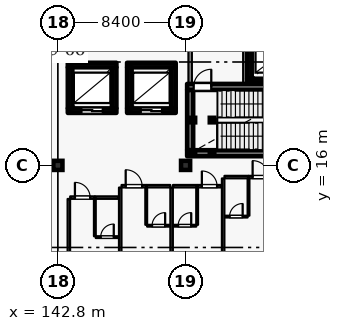
"""IFC4 building model, lengths in metres.
Left out: names, types, materials, properties, quantities, classifications, styles, units other than length and angle.
Written with IfcOpenShell. Run it as: python <this file> out.ifc"""

import sys

from ifc_helpers import new_model, si_unit, direction, frame, frame_2d, origin, origin_2d, place, context, subcontext, project, spatial, rectangle, hollow_rectangle, extrude, element, fill, save


model = new_model("IFC4")
c1 = context("Model", 3, precision=1e-05, world=origin(), true_north=direction((0.0, 1.0)))
c2 = subcontext(c1, "Body", "Model", "MODEL_VIEW")
j1 = project(units=[si_unit("LENGTHUNIT", "METRE"), si_unit("PLANEANGLEUNIT", "RADIAN")], contexts=[c1])
p1 = place(None, origin())
s1 = spatial("IfcSite", under=j1, at=p1, CompositionType="ELEMENT")
p2 = place(p1, origin())
s2 = spatial("IfcBuilding", under=s1, at=p2, CompositionType="ELEMENT")
p3 = place(p2, frame((0.0, 0.0, 43.2)))
s3 = spatial("IfcBuildingStorey", under=s2, at=p3, CompositionType="ELEMENT", Elevation=43.2)
for number, where, z_axis, x_axis in (
    (1, (142.8, 16.0, 0.0), (0.0, 0.0, 1.0), (1.0, 0.0, 0.0)),
    (2, (151.2, 16.0, 0.0), (0.0, 0.0, 1.0), (1.0, 0.0, 0.0)),
):
    element("IfcColumn", number, at=place(p3, frame(where, z_axis=z_axis, x_axis=x_axis)), inside=s3, PredefinedType="COLUMN", context=c2, shape_type="SweptSolid", body=[
        extrude(rectangle(XDim=0.6, YDim=0.6, at=origin_2d()), origin(), (0.0, 0.0, 1.0), 4.2),
    ])
p4 = place(p3, frame((155.25, 21.55, 0.0), z_axis=(0.0, 0.0, 1.0), x_axis=(1.0, 0.0, 0.0)))
e3 = element("IfcWall", 3, at=p4, inside=s3, PredefinedType="SHEAR", context=c2, shape_type="SweptSolid", body=[
    extrude(rectangle(XDim=3.5, YDim=0.3, at=frame_2d((1.75, 0.0))), origin(), (0.0, 0.0, 1.0), 3.935),
])
p5 = place(p3, frame((155.4, 24.295, 0.0), z_axis=(0.0, 0.0, 1.0), x_axis=(0.0, -1.0, 0.0)))
e4 = element("IfcWall", 4, at=p5, inside=s3, PredefinedType="SHEAR", context=c2, shape_type="SweptSolid", body=[
    extrude(rectangle(XDim=2.59, YDim=0.3, at=frame_2d((1.295, 0.0))), origin(), (0.0, 0.0, 1.0), 3.935),
])
p6 = place(p3, frame((143.45, 19.6, 0.0), z_axis=(0.0, 0.0, 1.0), x_axis=(1.0, 0.0, 0.0)))
e5 = element("IfcWall", 5, at=p6, inside=s3, PredefinedType="SHEAR", context=c2, shape_type="SweptSolid", body=[
    extrude(rectangle(XDim=3.2, YDim=0.3, at=frame_2d((1.6, 0.0))), origin(), (0.0, 0.0, 1.0), 3.935),
])
p7 = place(p6, frame((0.9, 0.0, 0.0)))
e6 = element("IfcOpeningElement", 6, at=p7, cuts=e5, PredefinedType="OPENING", context=c2, shape_type="SweptSolid", body=[
    extrude(rectangle(XDim=1.4, YDim=2.35, at=frame_2d((0.7, 1.175))), frame((0.0, 0.16, 0.0), z_axis=(0.0, -1.0, 0.0), x_axis=(1.0, 0.0, 0.0)), (0.0, 0.0, 1.0), 0.32),
])
p8 = place(p3, frame((146.5, 19.755, 0.0), z_axis=(0.0, 0.0, 1.0), x_axis=(0.0, 1.0, 0.0)))
e7 = element("IfcWall", 7, at=p8, inside=s3, PredefinedType="SHEAR", context=c2, shape_type="SweptSolid", body=[
    extrude(rectangle(XDim=2.69, YDim=0.3, at=frame_2d((1.345, 0.0))), origin(), (0.0, 0.0, 1.0), 3.935),
])
p9 = place(p3, frame((146.65, 22.6, 0.0), z_axis=(0.0, 0.0, 1.0), x_axis=(-1.0, 0.0, 0.0)))
e8 = element("IfcWall", 8, at=p9, inside=s3, PredefinedType="SHEAR", context=c2, shape_type="SweptSolid", body=[
    extrude(rectangle(XDim=3.2, YDim=0.3, at=frame_2d((1.6, 0.0))), origin(), (0.0, 0.0, 1.0), 3.935),
])
p10 = place(p3, frame((143.6, 22.445, 0.0), z_axis=(0.0, 0.0, 1.0), x_axis=(0.0, -1.0, 0.0)))
e9 = element("IfcWall", 9, at=p10, inside=s3, PredefinedType="SHEAR", context=c2, shape_type="SweptSolid", body=[
    extrude(rectangle(XDim=2.69, YDim=0.3, at=frame_2d((1.345, 0.0))), origin(), (0.0, 0.0, 1.0), 3.935),
])
p11 = place(p3, frame((147.35, 19.6, 0.0), z_axis=(0.0, 0.0, 1.0), x_axis=(1.0, 0.0, 0.0)))
e10 = element("IfcWall", 10, at=p11, inside=s3, PredefinedType="SHEAR", context=c2, shape_type="SweptSolid", body=[
    extrude(rectangle(XDim=3.2, YDim=0.3, at=frame_2d((1.6, 0.0))), origin(), (0.0, 0.0, 1.0), 3.935),
])
p12 = place(p11, frame((0.9, 0.0, 0.0)))
e11 = element("IfcOpeningElement", 11, at=p12, cuts=e10, PredefinedType="OPENING", context=c2, shape_type="SweptSolid", body=[
    extrude(rectangle(XDim=1.4, YDim=2.35, at=frame_2d((0.7, 1.175))), frame((0.0, 0.16, 0.0), z_axis=(0.0, -1.0, 0.0), x_axis=(1.0, 0.0, 0.0)), (0.0, 0.0, 1.0), 0.32),
])
p13 = place(p3, frame((150.4, 19.755, 0.0), z_axis=(0.0, 0.0, 1.0), x_axis=(0.0, 1.0, 0.0)))
e12 = element("IfcWall", 12, at=p13, inside=s3, PredefinedType="SHEAR", context=c2, shape_type="SweptSolid", body=[
    extrude(rectangle(XDim=2.69, YDim=0.3, at=frame_2d((1.345, 0.0))), origin(), (0.0, 0.0, 1.0), 3.935),
])
p14 = place(p3, frame((150.55, 22.6, 0.0), z_axis=(0.0, 0.0, 1.0), x_axis=(-1.0, 0.0, 0.0)))
e13 = element("IfcWall", 13, at=p14, inside=s3, PredefinedType="SHEAR", context=c2, shape_type="SweptSolid", body=[
    extrude(rectangle(XDim=3.2, YDim=0.3, at=frame_2d((1.6, 0.0))), origin(), (0.0, 0.0, 1.0), 3.935),
])
p15 = place(p3, frame((147.5, 22.445, 0.0), z_axis=(0.0, 0.0, 1.0), x_axis=(0.0, -1.0, 0.0)))
e14 = element("IfcWall", 14, at=p15, inside=s3, PredefinedType="SHEAR", context=c2, shape_type="SweptSolid", body=[
    extrude(rectangle(XDim=2.69, YDim=0.3, at=frame_2d((1.345, 0.0))), origin(), (0.0, 0.0, 1.0), 3.935),
])
p16 = place(p3, frame((151.3, 16.8, 0.0), z_axis=(0.0, 0.0, 1.0), x_axis=(1.0, 0.0, 0.0)))
e15 = element("IfcWall", 15, at=p16, inside=s3, PredefinedType="SHEAR", context=c2, shape_type="SweptSolid", body=[
    extrude(rectangle(XDim=8.2, YDim=0.4, at=frame_2d((4.1, 0.0))), origin(), (0.0, 0.0, 1.0), 3.935),
])
p17 = place(p3, frame((151.3, 21.16, 0.0), z_axis=(0.0, 0.0, 1.0), x_axis=(1.0, 0.0, 0.0)))
e16 = element("IfcWall", 16, at=p17, inside=s3, PredefinedType="SHEAR", context=c2, shape_type="SweptSolid", body=[
    extrude(rectangle(XDim=8.2, YDim=0.4, at=frame_2d((4.1, 0.0))), origin(), (0.0, 0.0, 1.0), 3.935),
])
p18 = place(p17, frame((0.43, 0.0, 0.0)))
e17 = element("IfcOpeningElement", 17, at=p18, cuts=e16, PredefinedType="OPENING", context=c2, shape_type="SweptSolid", body=[
    extrude(rectangle(XDim=1.16, YDim=2.2, at=frame_2d((0.58, 1.1))), frame((0.0, 0.21, 0.0), z_axis=(0.0, -1.0, 0.0), x_axis=(1.0, 0.0, 0.0)), (0.0, 0.0, 1.0), 0.42),
])
p19 = place(p3, frame((151.5, 17.005, 0.0), z_axis=(0.0, 0.0, 1.0), x_axis=(0.0, 1.0, 0.0)))
e18 = element("IfcWall", 18, at=p19, inside=s3, PredefinedType="SHEAR", context=c2, shape_type="SweptSolid", body=[
    extrude(rectangle(XDim=3.95, YDim=0.4, at=frame_2d((1.975, 0.0))), origin(), (0.0, 0.0, 1.0), 3.935),
])
p20 = place(p3, frame((151.5, 21.365, 0.0), z_axis=(0.0, 0.0, 1.0), x_axis=(0.0, 1.0, 0.0)))
e19 = element("IfcWall", 19, at=p20, inside=s3, PredefinedType="PARTITIONING", context=c2, shape_type="SweptSolid", body=[
    extrude(rectangle(XDim=5.82, YDim=0.22, at=frame_2d((2.91, 0.0))), origin(), (0.0, 0.0, 1.0), 3.935),
])
p21 = place(p3, frame((155.1, 21.365, 0.0), z_axis=(0.0, 0.0, 1.0), x_axis=(0.0, 1.0, 0.0)))
e20 = element("IfcWall", 20, at=p21, inside=s3, PredefinedType="PARTITIONING", context=c2, shape_type="SweptSolid", body=[
    extrude(rectangle(XDim=5.82, YDim=0.22, at=frame_2d((2.91, 0.0))), origin(), (0.0, 0.0, 1.0), 3.935),
])
p22 = place(p21, frame((3.335, 0.0, 0.0)))
e21 = element("IfcOpeningElement", 21, at=p22, cuts=e20, PredefinedType="OPENING", context=c2, shape_type="SweptSolid", body=[
    extrude(rectangle(XDim=1.24, YDim=2.2, at=frame_2d((0.62, 1.1))), frame((0.0, 0.12, 0.0), z_axis=(0.0, -1.0, 0.0), x_axis=(1.0, 0.0, 0.0)), (0.0, 0.0, 1.0), 0.24),
])
for number, where, z_axis, x_axis in (
    (22, (151.68, 16.8, 0.0), (0.0, 0.0, 1.0), (1.0, 0.0, 0.0)),
    (23, (151.68, 18.98, 0.0), (0.0, 0.0, 1.0), (1.0, 0.0, 0.0)),
    (24, (152.94, 16.8, 0.0), (0.0, 0.0, 1.0), (1.0, 0.0, 0.0)),
    (25, (152.94, 18.98, 0.0), (0.0, 0.0, 1.0), (1.0, 0.0, 0.0)),
):
    element("IfcColumn", number, at=place(p3, frame(where, z_axis=z_axis, x_axis=x_axis)), inside=s3, PredefinedType="COLUMN", context=c2, shape_type="SweptSolid", body=[
        extrude(hollow_rectangle(XDim=0.3, YDim=0.3, WallThickness=0.012, at=origin_2d()), origin(), (0.0, 0.0, 1.0), 4.02),
    ])
p23 = place(p3, frame((143.61, 13.88, 0.0), z_axis=(0.0, 0.0, 1.0), x_axis=(1.0, 0.0, 0.0)))
e26 = element("IfcWall", 26, at=p23, inside=s3, PredefinedType="PARTITIONING", context=c2, shape_type="SweptSolid", body=[
    extrude(rectangle(XDim=1.62, YDim=0.16, at=frame_2d((0.81, 0.0))), origin(), (0.0, 0.0, 1.0), 3.935),
])
p24 = place(p23, frame((0.31, 0.0, 0.0)))
e27 = element("IfcOpeningElement", 27, at=p24, cuts=e26, PredefinedType="OPENING", context=c2, shape_type="SweptSolid", body=[
    extrude(rectangle(XDim=1.0, YDim=2.25, at=frame_2d((0.5, 1.125))), frame((0.0, 0.09, 0.0), z_axis=(0.0, -1.0, 0.0), x_axis=(1.0, 0.0, 0.0)), (0.0, 0.0, 1.0), 0.18),
])
p25 = place(p3, frame((145.24, 13.88, 0.0), z_axis=(0.0, 0.0, 1.0), x_axis=(1.0, 0.0, 0.0)))
e28 = element("IfcWall", 28, at=p25, inside=s3, PredefinedType="PARTITIONING", context=c2, shape_type="SweptSolid", body=[
    extrude(rectangle(XDim=1.57, YDim=0.16, at=frame_2d((0.785, 0.0))), origin(), (0.0, 0.0, 1.0), 3.935),
])
p26 = place(p3, frame((145.23, 11.34, 0.0), z_axis=(0.0, 0.0, 1.0), x_axis=(0.0, 1.0, 0.0)))
e29 = element("IfcWall", 29, at=p26, inside=s3, PredefinedType="PARTITIONING", context=c2, shape_type="SweptSolid", body=[
    extrude(rectangle(XDim=2.45, YDim=0.115, at=frame_2d((1.225, 0.0))), origin(), (0.0, 0.0, 1.0), 3.935),
])
p27 = place(p3, frame((145.29, 11.28, 0.0), z_axis=(0.0, 0.0, 1.0), x_axis=(1.0, 0.0, 0.0)))
e30 = element("IfcWall", 30, at=p27, inside=s3, PredefinedType="PARTITIONING", context=c2, shape_type="SweptSolid", body=[
    extrude(rectangle(XDim=1.51, YDim=0.115, at=frame_2d((0.755, 0.0))), origin(), (0.0, 0.0, 1.0), 3.935),
])
p28 = place(p27, frame((0.325, 0.0, 0.0)))
e31 = element("IfcOpeningElement", 31, at=p28, cuts=e30, PredefinedType="OPENING", context=c2, shape_type="SweptSolid", body=[
    extrude(rectangle(XDim=0.86, YDim=2.12, at=frame_2d((0.43, 1.06))), frame((0.0, 0.067, 0.0), z_axis=(0.0, -1.0, 0.0), x_axis=(1.0, 0.0, 0.0)), (0.0, 0.0, 1.0), 0.135),
])
p29 = place(p3, frame((143.52, 4.24, 0.0), z_axis=(0.0, 0.0, 1.0), x_axis=(0.0, 1.0, 0.0)))
e32 = element("IfcWall", 32, at=p29, inside=s3, PredefinedType="PARTITIONING", context=c2, shape_type="SweptSolid", body=[
    extrude(rectangle(XDim=9.55, YDim=0.16, at=frame_2d((4.775, 0.0))), origin(), (0.0, 0.0, 1.0), 3.935),
])
p30 = place(p3, frame((146.99, 14.63, 0.0), z_axis=(0.0, 0.0, 1.0), x_axis=(1.0, 0.0, 0.0)))
e33 = element("IfcWall", 33, at=p30, inside=s3, PredefinedType="PARTITIONING", context=c2, shape_type="SweptSolid", body=[
    extrude(rectangle(XDim=1.62, YDim=0.16, at=frame_2d((0.81, 0.0))), origin(), (0.0, 0.0, 1.0), 3.935),
])
p31 = place(p30, frame((0.27, 0.0, 0.0)))
e34 = element("IfcOpeningElement", 34, at=p31, cuts=e33, PredefinedType="OPENING", context=c2, shape_type="SweptSolid", body=[
    extrude(rectangle(XDim=1.08, YDim=2.3, at=frame_2d((0.54, 1.15))), frame((0.0, 0.09, 0.0), z_axis=(0.0, -1.0, 0.0), x_axis=(1.0, 0.0, 0.0)), (0.0, 0.0, 1.0), 0.18),
])
p32 = place(p3, frame((148.62, 14.63, 0.0), z_axis=(0.0, 0.0, 1.0), x_axis=(1.0, 0.0, 0.0)))
e35 = element("IfcWall", 35, at=p32, inside=s3, PredefinedType="PARTITIONING", context=c2, shape_type="SweptSolid", body=[
    extrude(rectangle(XDim=1.57, YDim=0.16, at=frame_2d((0.785, 0.0))), origin(), (0.0, 0.0, 1.0), 3.935),
])
p33 = place(p3, frame((148.61, 12.09, 0.0), z_axis=(0.0, 0.0, 1.0), x_axis=(0.0, 1.0, 0.0)))
e36 = element("IfcWall", 36, at=p33, inside=s3, PredefinedType="PARTITIONING", context=c2, shape_type="SweptSolid", body=[
    extrude(rectangle(XDim=2.45, YDim=0.115, at=frame_2d((1.225, 0.0))), origin(), (0.0, 0.0, 1.0), 3.935),
])
p34 = place(p3, frame((148.67, 12.03, 0.0), z_axis=(0.0, 0.0, 1.0), x_axis=(1.0, 0.0, 0.0)))
e37 = element("IfcWall", 37, at=p34, inside=s3, PredefinedType="PARTITIONING", context=c2, shape_type="SweptSolid", body=[
    extrude(rectangle(XDim=1.51, YDim=0.115, at=frame_2d((0.755, 0.0))), origin(), (0.0, 0.0, 1.0), 3.935),
])
p35 = place(p34, frame((0.325, 0.0, 0.0)))
e38 = element("IfcOpeningElement", 38, at=p35, cuts=e37, PredefinedType="OPENING", context=c2, shape_type="SweptSolid", body=[
    extrude(rectangle(XDim=0.86, YDim=2.12, at=frame_2d((0.43, 1.06))), frame((0.0, 0.067, 0.0), z_axis=(0.0, -1.0, 0.0), x_axis=(1.0, 0.0, 0.0)), (0.0, 0.0, 1.0), 0.135),
])
p36 = place(p3, frame((146.9, 7.46, 0.0), z_axis=(0.0, 0.0, 1.0), x_axis=(0.0, 1.0, 0.0)))
e39 = element("IfcWall", 39, at=p36, inside=s3, PredefinedType="PARTITIONING", context=c2, shape_type="SweptSolid", body=[
    extrude(rectangle(XDim=7.08, YDim=0.16, at=frame_2d((3.54, 0.0))), origin(), (0.0, 0.0, 1.0), 3.935),
])
p37 = place(p3, frame((150.37, 14.63, 0.0), z_axis=(0.0, 0.0, 1.0), x_axis=(1.0, 0.0, 0.0)))
e40 = element("IfcWall", 40, at=p37, inside=s3, PredefinedType="PARTITIONING", context=c2, shape_type="SweptSolid", body=[
    extrude(rectangle(XDim=1.58, YDim=0.16, at=frame_2d((0.79, 0.0))), origin(), (0.0, 0.0, 1.0), 3.935),
])
p38 = place(p3, frame((151.96, 14.63, 0.0), z_axis=(0.0, 0.0, 1.0), x_axis=(1.0, 0.0, 0.0)))
e41 = element("IfcWall", 41, at=p38, inside=s3, PredefinedType="PARTITIONING", context=c2, shape_type="SweptSolid", body=[
    extrude(rectangle(XDim=1.62, YDim=0.16, at=frame_2d((0.81, 0.0))), origin(), (0.0, 0.0, 1.0), 3.935),
])
p39 = place(p38, frame((0.31, 0.0, 0.0)))
e42 = element("IfcOpeningElement", 42, at=p39, cuts=e41, PredefinedType="OPENING", context=c2, shape_type="SweptSolid", body=[
    extrude(rectangle(XDim=1.0, YDim=2.25, at=frame_2d((0.5, 1.125))), frame((0.0, 0.09, 0.0), z_axis=(0.0, -1.0, 0.0), x_axis=(1.0, 0.0, 0.0)), (0.0, 0.0, 1.0), 0.18),
])
p40 = place(p3, frame((151.96, 12.09, 0.0), z_axis=(0.0, 0.0, 1.0), x_axis=(0.0, 1.0, 0.0)))
e43 = element("IfcWall", 43, at=p40, inside=s3, PredefinedType="PARTITIONING", context=c2, shape_type="SweptSolid", body=[
    extrude(rectangle(XDim=2.45, YDim=0.115, at=frame_2d((1.225, 0.0))), origin(), (0.0, 0.0, 1.0), 3.935),
])
p41 = place(p3, frame((150.38, 12.03, 0.0), z_axis=(0.0, 0.0, 1.0), x_axis=(1.0, 0.0, 0.0)))
e44 = element("IfcWall", 44, at=p41, inside=s3, PredefinedType="PARTITIONING", context=c2, shape_type="SweptSolid", body=[
    extrude(rectangle(XDim=1.52, YDim=0.115, at=frame_2d((0.76, 0.0))), origin(), (0.0, 0.0, 1.0), 3.935),
])
p42 = place(p41, frame((0.33, 0.0, 0.0)))
e45 = element("IfcOpeningElement", 45, at=p42, cuts=e44, PredefinedType="OPENING", context=c2, shape_type="SweptSolid", body=[
    extrude(rectangle(XDim=0.86, YDim=2.12, at=frame_2d((0.43, 1.06))), frame((0.0, 0.067, 0.0), z_axis=(0.0, -1.0, 0.0), x_axis=(1.0, 0.0, 0.0)), (0.0, 0.0, 1.0), 0.135),
])
p43 = place(p3, frame((150.28, 8.34, 0.0), z_axis=(0.0, 0.0, 1.0), x_axis=(0.0, 1.0, 0.0)))
e46 = element("IfcWall", 46, at=p43, inside=s3, PredefinedType="PARTITIONING", context=c2, shape_type="SweptSolid", body=[
    extrude(rectangle(XDim=6.2, YDim=0.16, at=frame_2d((3.1, 0.0))), origin(), (0.0, 0.0, 1.0), 3.935),
])
p44 = place(p3, frame((153.76, 15.23, 0.0), z_axis=(0.0, 0.0, 1.0), x_axis=(1.0, 0.0, 0.0)))
e47 = element("IfcWall", 47, at=p44, inside=s3, PredefinedType="PARTITIONING", context=c2, shape_type="SweptSolid", body=[
    extrude(rectangle(XDim=1.57, YDim=0.16, at=frame_2d((0.785, 0.0))), origin(), (0.0, 0.0, 1.0), 3.935),
])
p45 = place(p3, frame((155.34, 15.23, 0.0), z_axis=(0.0, 0.0, 1.0), x_axis=(1.0, 0.0, 0.0)))
e48 = element("IfcWall", 48, at=p45, inside=s3, PredefinedType="PARTITIONING", context=c2, shape_type="SweptSolid", body=[
    extrude(rectangle(XDim=1.62, YDim=0.16, at=frame_2d((0.81, 0.0))), origin(), (0.0, 0.0, 1.0), 3.935),
])
p46 = place(p45, frame((0.27, 0.0, 0.0)))
e49 = element("IfcOpeningElement", 49, at=p46, cuts=e48, PredefinedType="OPENING", context=c2, shape_type="SweptSolid", body=[
    extrude(rectangle(XDim=1.08, YDim=2.3, at=frame_2d((0.54, 1.15))), frame((0.0, 0.09, 0.0), z_axis=(0.0, -1.0, 0.0), x_axis=(1.0, 0.0, 0.0)), (0.0, 0.0, 1.0), 0.18),
])
p47 = place(p3, frame((155.34, 12.69, 0.0), z_axis=(0.0, 0.0, 1.0), x_axis=(0.0, 1.0, 0.0)))
e50 = element("IfcWall", 50, at=p47, inside=s3, PredefinedType="PARTITIONING", context=c2, shape_type="SweptSolid", body=[
    extrude(rectangle(XDim=2.45, YDim=0.115, at=frame_2d((1.225, 0.0))), origin(), (0.0, 0.0, 1.0), 3.935),
])
p48 = place(p3, frame((153.77, 12.63, 0.0), z_axis=(0.0, 0.0, 1.0), x_axis=(1.0, 0.0, 0.0)))
e51 = element("IfcWall", 51, at=p48, inside=s3, PredefinedType="PARTITIONING", context=c2, shape_type="SweptSolid", body=[
    extrude(rectangle(XDim=1.51, YDim=0.115, at=frame_2d((0.755, 0.0))), origin(), (0.0, 0.0, 1.0), 3.935),
])
p49 = place(p48, frame((0.325, 0.0, 0.0)))
e52 = element("IfcOpeningElement", 52, at=p49, cuts=e51, PredefinedType="OPENING", context=c2, shape_type="SweptSolid", body=[
    extrude(rectangle(XDim=0.86, YDim=2.12, at=frame_2d((0.43, 1.06))), frame((0.0, 0.067, 0.0), z_axis=(0.0, -1.0, 0.0), x_axis=(1.0, 0.0, 0.0)), (0.0, 0.0, 1.0), 0.135),
])
p50 = place(p3, frame((153.67, 8.34, 0.0), z_axis=(0.0, 0.0, 1.0), x_axis=(0.0, 1.0, 0.0)))
e53 = element("IfcWall", 53, at=p50, inside=s3, PredefinedType="PARTITIONING", context=c2, shape_type="SweptSolid", body=[
    extrude(rectangle(XDim=6.8, YDim=0.16, at=frame_2d((3.4, 0.0))), origin(), (0.0, 0.0, 1.0), 3.935),
])
p51 = place(p7, origin())
e54 = element("IfcDoor", 54, at=p51, inside=s3, OperationType="DOUBLE_DOOR_SLIDING", PredefinedType="DOOR", context=c2, shape_type="SweptSolid", body=[
    extrude(rectangle(XDim=1.4, YDim=2.35, at=frame_2d((0.7, 1.175))), frame((0.0, 0.025, 0.0), z_axis=(0.0, -1.0, 0.0), x_axis=(1.0, 0.0, 0.0)), (0.0, 0.0, 1.0), 0.05),
])
fill(e6, e54)
p52 = place(p12, origin())
e55 = element("IfcDoor", 55, at=p52, inside=s3, OperationType="DOUBLE_DOOR_SLIDING", PredefinedType="DOOR", context=c2, shape_type="SweptSolid", body=[
    extrude(rectangle(XDim=1.4, YDim=2.35, at=frame_2d((0.7, 1.175))), frame((0.0, 0.025, 0.0), z_axis=(0.0, -1.0, 0.0), x_axis=(1.0, 0.0, 0.0)), (0.0, 0.0, 1.0), 0.05),
])
fill(e11, e55)
p53 = place(p18, origin())
e56 = element("IfcDoor", 56, at=p53, inside=s3, OperationType="SINGLE_SWING_RIGHT", PredefinedType="DOOR", context=c2, shape_type="SweptSolid", body=[
    extrude(rectangle(XDim=1.16, YDim=2.2, at=frame_2d((0.58, 1.1))), frame((0.0, 0.025, 0.0), z_axis=(0.0, -1.0, 0.0), x_axis=(1.0, 0.0, 0.0)), (0.0, 0.0, 1.0), 0.05),
])
fill(e17, e56)
p54 = place(p24, origin())
e57 = element("IfcDoor", 57, at=p54, inside=s3, OperationType="SINGLE_SWING_LEFT", PredefinedType="DOOR", context=c2, shape_type="SweptSolid", body=[
    extrude(rectangle(XDim=1.0, YDim=2.25, at=frame_2d((0.5, 1.125))), frame((0.0, 0.025, 0.0), z_axis=(0.0, -1.0, 0.0), x_axis=(1.0, 0.0, 0.0)), (0.0, 0.0, 1.0), 0.05),
])
fill(e27, e57)
p55 = place(p28, origin())
e58 = element("IfcDoor", 58, at=p55, inside=s3, OperationType="SINGLE_SWING_RIGHT", PredefinedType="DOOR", context=c2, shape_type="SweptSolid", body=[
    extrude(rectangle(XDim=0.86, YDim=2.12, at=frame_2d((0.43, 1.06))), frame((0.0, 0.025, 0.0), z_axis=(0.0, -1.0, 0.0), x_axis=(1.0, 0.0, 0.0)), (0.0, 0.0, 1.0), 0.05),
])
fill(e31, e58)
p56 = place(p31, origin())
e59 = element("IfcDoor", 59, at=p56, inside=s3, OperationType="SINGLE_SWING_LEFT", PredefinedType="DOOR", context=c2, shape_type="SweptSolid", body=[
    extrude(rectangle(XDim=1.08, YDim=2.3, at=frame_2d((0.54, 1.15))), frame((0.0, 0.025, 0.0), z_axis=(0.0, -1.0, 0.0), x_axis=(1.0, 0.0, 0.0)), (0.0, 0.0, 1.0), 0.05),
])
fill(e34, e59)
p57 = place(p35, origin())
e60 = element("IfcDoor", 60, at=p57, inside=s3, OperationType="SINGLE_SWING_RIGHT", PredefinedType="DOOR", context=c2, shape_type="SweptSolid", body=[
    extrude(rectangle(XDim=0.86, YDim=2.12, at=frame_2d((0.43, 1.06))), frame((0.0, 0.025, 0.0), z_axis=(0.0, -1.0, 0.0), x_axis=(1.0, 0.0, 0.0)), (0.0, 0.0, 1.0), 0.05),
])
fill(e38, e60)
p58 = place(p39, origin())
e61 = element("IfcDoor", 61, at=p58, inside=s3, OperationType="SINGLE_SWING_LEFT", PredefinedType="DOOR", context=c2, shape_type="SweptSolid", body=[
    extrude(rectangle(XDim=1.0, YDim=2.25, at=frame_2d((0.5, 1.125))), frame((0.0, 0.025, 0.0), z_axis=(0.0, -1.0, 0.0), x_axis=(1.0, 0.0, 0.0)), (0.0, 0.0, 1.0), 0.05),
])
fill(e42, e61)
p59 = place(p42, origin())
e62 = element("IfcDoor", 62, at=p59, inside=s3, OperationType="SINGLE_SWING_RIGHT", PredefinedType="DOOR", context=c2, shape_type="SweptSolid", body=[
    extrude(rectangle(XDim=0.86, YDim=2.12, at=frame_2d((0.43, 1.06))), frame((0.0, 0.025, 0.0), z_axis=(0.0, -1.0, 0.0), x_axis=(1.0, 0.0, 0.0)), (0.0, 0.0, 1.0), 0.05),
])
fill(e45, e62)
p60 = place(p46, origin())
e63 = element("IfcDoor", 63, at=p60, inside=s3, OperationType="SINGLE_SWING_LEFT", PredefinedType="DOOR", context=c2, shape_type="SweptSolid", body=[
    extrude(rectangle(XDim=1.08, YDim=2.3, at=frame_2d((0.54, 1.15))), frame((0.0, 0.025, 0.0), z_axis=(0.0, -1.0, 0.0), x_axis=(1.0, 0.0, 0.0)), (0.0, 0.0, 1.0), 0.05),
])
fill(e49, e63)
p61 = place(p49, origin())
e64 = element("IfcDoor", 64, at=p61, inside=s3, OperationType="SINGLE_SWING_RIGHT", PredefinedType="DOOR", context=c2, shape_type="SweptSolid", body=[
    extrude(rectangle(XDim=0.86, YDim=2.12, at=frame_2d((0.43, 1.06))), frame((0.0, 0.025, 0.0), z_axis=(0.0, -1.0, 0.0), x_axis=(1.0, 0.0, 0.0)), (0.0, 0.0, 1.0), 0.05),
])
fill(e52, e64)
save(model, sys.argv[1])
